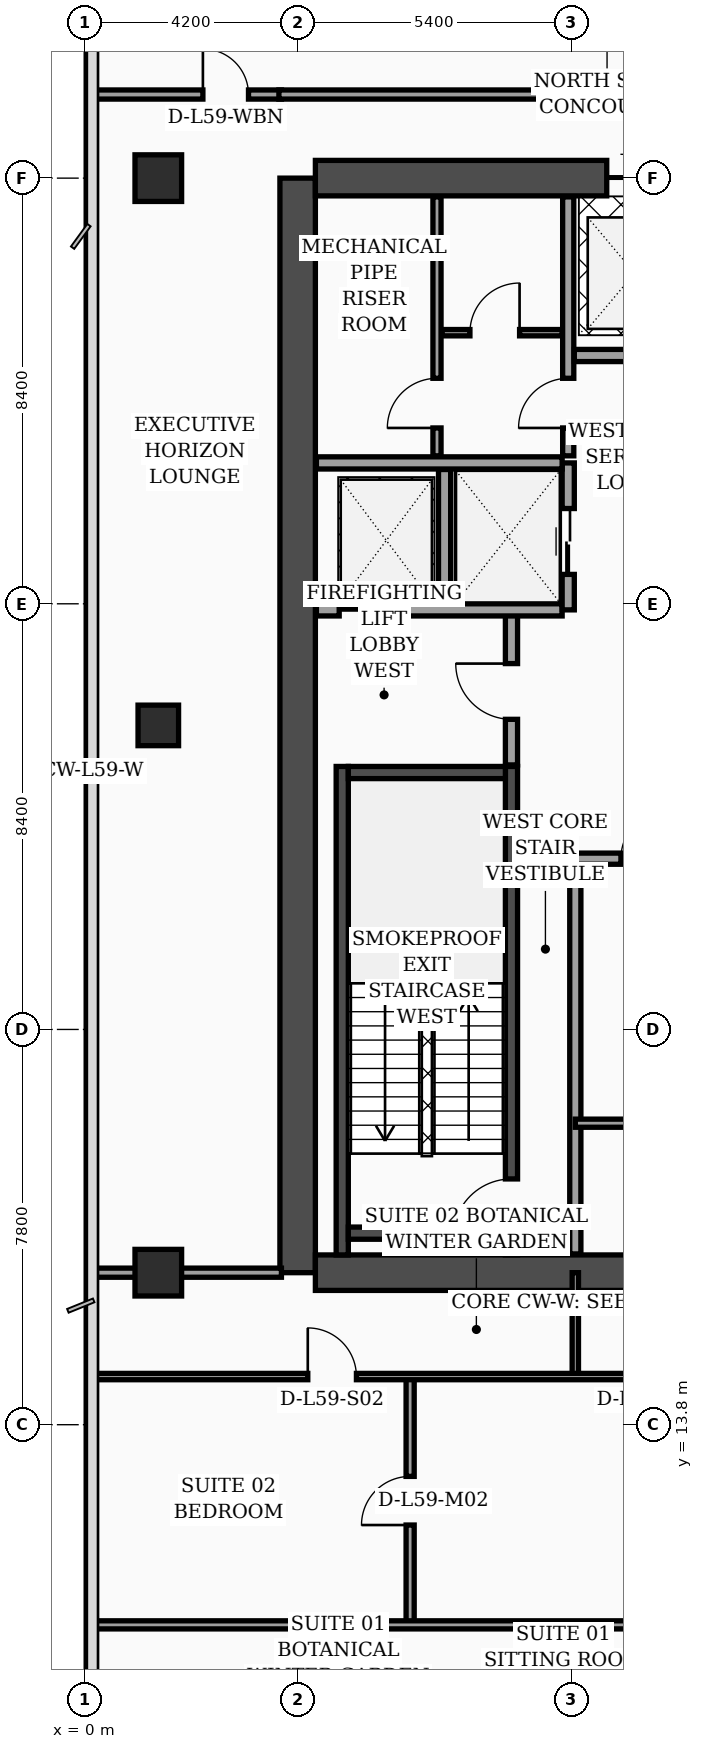
"""IFC4 building model, lengths in metres.
Left out: names, types, materials, properties, quantities, classifications, styles, units other than length and angle.
Written with IfcOpenShell. Run it as: python <this file> out.ifc"""

import sys

from ifc_helpers import new_model, si_unit, direction, frame, frame_2d, origin, origin_2d, place, context, subcontext, project, spatial, rectangle, extrude, element, fill, save


model = new_model("IFC4")
c1 = context("Model", 3, precision=1e-05, world=origin(), true_north=direction((0.0, 1.0)))
c2 = subcontext(c1, "Body", "Model", "MODEL_VIEW")
j1 = project(units=[si_unit("LENGTHUNIT", "METRE"), si_unit("PLANEANGLEUNIT", "RADIAN")], contexts=[c1])
p1 = place(None, origin())
s1 = spatial("IfcSite", under=j1, at=p1, CompositionType="ELEMENT")
p2 = place(p1, origin())
s2 = spatial("IfcBuilding", under=s1, at=p2, CompositionType="ELEMENT")
p3 = place(p2, frame((0.0, 0.0, 239.3)))
s3 = spatial("IfcBuildingStorey", under=s2, at=p3, CompositionType="ELEMENT", Elevation=239.3)
p4 = place(p3, frame((4.2, 16.8, 0.0), z_axis=(0.0, 0.0, 1.0), x_axis=(0.0, 1.0, 0.0)))
e1 = element("IfcWall", 1, at=p4, inside=s3, PredefinedType="SHEAR", context=c2, shape_type="SweptSolid", body=[
    extrude(rectangle(XDim=21.6, YDim=0.7, at=frame_2d((10.8, 0.0))), origin(), (0.0, 0.0, 1.0), 4.05),
])
p5 = place(p3, frame((4.55, 38.4, 0.0), z_axis=(0.0, 0.0, 1.0), x_axis=(1.0, 0.0, 0.0)))
e2 = element("IfcWall", 2, at=p5, inside=s3, PredefinedType="SHEAR", context=c2, shape_type="SweptSolid", body=[
    extrude(rectangle(XDim=10.1, YDim=0.7, at=frame_2d((5.05, 0.0))), origin(), (0.0, 0.0, 1.0), 4.05),
])
p6 = place(p5, frame((5.75, 0.0, 0.0)))
e3 = element("IfcOpeningElement", 3, at=p6, cuts=e2, PredefinedType="OPENING", context=c2, shape_type="SweptSolid", body=[
    extrude(rectangle(XDim=1.1, YDim=2.2, at=frame_2d((0.55, 1.1))), frame((0.0, 0.36, 0.0), z_axis=(0.0, -1.0, 0.0), x_axis=(1.0, 0.0, 0.0)), (0.0, 0.0, 1.0), 0.72),
])
p7 = place(p3, frame((4.55, 16.8, 0.0), z_axis=(0.0, 0.0, 1.0), x_axis=(1.0, 0.0, 0.0)))
e4 = element("IfcWall", 4, at=p7, inside=s3, PredefinedType="SHEAR", context=c2, shape_type="SweptSolid", body=[
    extrude(rectangle(XDim=10.1, YDim=0.7, at=frame_2d((5.05, 0.0))), origin(), (0.0, 0.0, 1.0), 4.05),
])
p8 = place(p3, frame((5.08, 17.15, 0.0), z_axis=(0.0, 0.0, 1.0), x_axis=(0.0, 1.0, 0.0)))
e5 = element("IfcWall", 5, at=p8, inside=s3, PredefinedType="SOLIDWALL", context=c2, shape_type="SweptSolid", body=[
    extrude(rectangle(XDim=9.64, YDim=0.24, at=frame_2d((4.82, 0.0))), origin(), (0.0, 0.0, 1.0), 4.05),
])
p9 = place(p3, frame((8.42, 17.15, 0.0), z_axis=(0.0, 0.0, 1.0), x_axis=(0.0, 1.0, 0.0)))
e6 = element("IfcWall", 6, at=p9, inside=s3, PredefinedType="SOLIDWALL", context=c2, shape_type="SweptSolid", body=[
    extrude(rectangle(XDim=9.64, YDim=0.24, at=frame_2d((4.82, 0.0))), origin(), (0.0, 0.0, 1.0), 4.05),
])
p10 = place(p9, frame((0.35, 0.0, 0.0)))
e7 = element("IfcOpeningElement", 7, at=p10, cuts=e6, PredefinedType="OPENING", context=c2, shape_type="SweptSolid", body=[
    extrude(rectangle(XDim=1.15, YDim=2.2, at=frame_2d((0.575, 1.1))), frame((0.0, 0.13, 0.0), z_axis=(0.0, -1.0, 0.0), x_axis=(1.0, 0.0, 0.0)), (0.0, 0.0, 1.0), 0.26),
])
for number, where, z_axis, x_axis in (
    (8, (5.2, 17.58, 0.0), (0.0, 0.0, 1.0), (1.0, 0.0, 0.0)),
    (9, (5.2, 26.67, 0.0), (0.0, 0.0, 1.0), (1.0, 0.0, 0.0)),
):
    element("IfcWall", number, at=place(p3, frame(where, z_axis=z_axis, x_axis=x_axis)), inside=s3, PredefinedType="SOLIDWALL", context=c2, shape_type="SweptSolid", body=[
        extrude(rectangle(XDim=3.1, YDim=0.24, at=frame_2d((1.55, 0.0))), origin(), (0.0, 0.0, 1.0), 4.05),
    ])
p11 = place(p3, frame((1.45, 16.8, 0.0), z_axis=(0.0, 0.0, 1.0), x_axis=(1.0, 0.0, 0.0)))
e10 = element("IfcColumn", 10, at=p11, inside=s3, PredefinedType="COLUMN", context=c2, shape_type="SweptSolid", body=[
    extrude(rectangle(XDim=0.92, YDim=0.92, at=origin_2d()), origin(), (0.0, 0.0, 1.0), 4.05),
])
p12 = place(p3, frame((1.45, 27.6, 0.0), z_axis=(0.0, 0.0, 1.0), x_axis=(1.0, 0.0, 0.0)))
e11 = element("IfcColumn", 11, at=p12, inside=s3, PredefinedType="COLUMN", context=c2, shape_type="SweptSolid", body=[
    extrude(rectangle(XDim=0.8, YDim=0.8, at=origin_2d()), origin(), (0.0, 0.0, 1.0), 4.05),
])
p13 = place(p3, frame((1.45, 38.4, 0.0), z_axis=(0.0, 0.0, 1.0), x_axis=(1.0, 0.0, 0.0)))
e12 = element("IfcColumn", 12, at=p13, inside=s3, PredefinedType="COLUMN", context=c2, shape_type="SweptSolid", body=[
    extrude(rectangle(XDim=0.92, YDim=0.92, at=origin_2d()), origin(), (0.0, 0.0, 1.0), 4.05),
])
p14 = place(p3, frame((8.42, 26.82, 0.0), z_axis=(0.0, 0.0, 1.0), x_axis=(0.0, 1.0, 0.0)))
e13 = element("IfcWall", 13, at=p14, inside=s3, PredefinedType="SOLIDWALL", context=c2, shape_type="SweptSolid", body=[
    extrude(rectangle(XDim=3.0, YDim=0.24, at=frame_2d((1.5, 0.0))), origin(), (0.0, 0.0, 1.0), 4.05),
])
p15 = place(p14, frame((0.9, 0.0, 0.0)))
e14 = element("IfcOpeningElement", 14, at=p15, cuts=e13, PredefinedType="OPENING", context=c2, shape_type="SweptSolid", body=[
    extrude(rectangle(XDim=1.1, YDim=2.2, at=frame_2d((0.55, 1.1))), frame((0.0, 0.13, 0.0), z_axis=(0.0, -1.0, 0.0), x_axis=(1.0, 0.0, 0.0)), (0.0, 0.0, 1.0), 0.26),
])
p16 = place(p3, frame((4.57, 29.88, 0.0), z_axis=(0.0, 0.0, 1.0), x_axis=(1.0, 0.0, 0.0)))
e15 = element("IfcWall", 15, at=p16, inside=s3, PredefinedType="SOLIDWALL", context=c2, shape_type="SweptSolid", body=[
    extrude(rectangle(XDim=4.85, YDim=0.24, at=frame_2d((2.425, 0.0))), origin(), (0.0, 0.0, 1.0), 4.05),
])
p17 = place(p16, frame((0.45, 0.0, 0.0)))
e16 = element("IfcOpeningElement", 16, at=p17, cuts=e15, PredefinedType="OPENING", context=c2, shape_type="SweptSolid", body=[
    extrude(rectangle(XDim=1.3, YDim=2.35, at=frame_2d((0.65, 1.175))), frame((0.0, 0.13, 0.0), z_axis=(0.0, -1.0, 0.0), x_axis=(1.0, 0.0, 0.0)), (0.0, 0.0, 1.0), 0.26),
])
p18 = place(p3, frame((7.1, 30.02, 0.0), z_axis=(0.0, 0.0, 1.0), x_axis=(0.0, 1.0, 0.0)))
e17 = element("IfcWall", 17, at=p18, inside=s3, PredefinedType="SOLIDWALL", context=c2, shape_type="SweptSolid", body=[
    extrude(rectangle(XDim=2.63, YDim=0.24, at=frame_2d((1.315, 0.0))), origin(), (0.0, 0.0, 1.0), 4.05),
])
p19 = place(p3, frame((9.54, 29.88, 0.0), z_axis=(0.0, 0.0, 1.0), x_axis=(0.0, 1.0, 0.0)))
e18 = element("IfcWall", 18, at=p19, inside=s3, PredefinedType="SOLIDWALL", context=c2, shape_type="SweptSolid", body=[
    extrude(rectangle(XDim=2.9, YDim=0.24, at=frame_2d((1.45, 0.0))), origin(), (0.0, 0.0, 1.0), 4.05),
])
p20 = place(p19, frame((0.7, 0.0, 0.0)))
e19 = element("IfcOpeningElement", 19, at=p20, cuts=e18, PredefinedType="OPENING", context=c2, shape_type="SweptSolid", body=[
    extrude(rectangle(XDim=1.3, YDim=2.35, at=frame_2d((0.65, 1.175))), frame((0.0, 0.13, 0.0), z_axis=(0.0, -1.0, 0.0), x_axis=(1.0, 0.0, 0.0)), (0.0, 0.0, 1.0), 0.26),
])
p21 = place(p3, frame((4.57, 32.78, 0.0), z_axis=(0.0, 0.0, 1.0), x_axis=(1.0, 0.0, 0.0)))
e20 = element("IfcWall", 20, at=p21, inside=s3, PredefinedType="SOLIDWALL", context=c2, shape_type="SweptSolid", body=[
    extrude(rectangle(XDim=4.85, YDim=0.24, at=frame_2d((2.425, 0.0))), origin(), (0.0, 0.0, 1.0), 3.7),
])
p22 = place(p3, frame((9.68, 17.17, 0.0), z_axis=(0.0, 0.0, 1.0), x_axis=(0.0, 1.0, 0.0)))
e21 = element("IfcWall", 21, at=p22, inside=s3, PredefinedType="SOLIDWALL", context=c2, shape_type="SweptSolid", body=[
    extrude(rectangle(XDim=7.83, YDim=0.22, at=frame_2d((3.915, 0.0))), origin(), (0.0, 0.0, 1.0), 4.05),
])
p23 = place(p3, frame((6.95, 32.92, 0.0), z_axis=(0.0, 0.0, 1.0), x_axis=(0.0, 1.0, 0.0)))
e22 = element("IfcWall", 22, at=p23, inside=s3, PredefinedType="PARTITIONING", context=c2, shape_type="SweptSolid", body=[
    extrude(rectangle(XDim=5.11, YDim=0.16, at=frame_2d((2.555, 0.0))), origin(), (0.0, 0.0, 1.0), 4.05),
])
p24 = place(p23, frame((0.55, 0.0, 0.0)))
e23 = element("IfcOpeningElement", 23, at=p24, cuts=e22, PredefinedType="OPENING", context=c2, shape_type="SweptSolid", body=[
    extrude(rectangle(XDim=0.98, YDim=2.15, at=frame_2d((0.49, 1.075))), frame((0.0, 0.09, 0.0), z_axis=(0.0, -1.0, 0.0), x_axis=(1.0, 0.0, 0.0)), (0.0, 0.0, 1.0), 0.18),
])
p25 = place(p3, frame((7.05, 35.35, 0.0), z_axis=(0.0, 0.0, 1.0), x_axis=(1.0, 0.0, 0.0)))
e24 = element("IfcWall", 24, at=p25, inside=s3, PredefinedType="PARTITIONING", context=c2, shape_type="SweptSolid", body=[
    extrude(rectangle(XDim=2.37, YDim=0.125, at=frame_2d((1.185, 0.0))), origin(), (0.0, 0.0, 1.0), 4.05),
])
p26 = place(p25, frame((0.55, 0.0, 0.0)))
e25 = element("IfcOpeningElement", 25, at=p26, cuts=e24, PredefinedType="OPENING", context=c2, shape_type="SweptSolid", body=[
    extrude(rectangle(XDim=0.98, YDim=2.15, at=frame_2d((0.49, 1.075))), frame((0.0, 0.073, 0.0), z_axis=(0.0, -1.0, 0.0), x_axis=(1.0, 0.0, 0.0)), (0.0, 0.0, 1.0), 0.145),
])
p27 = place(p3, frame((9.54, 32.92, 0.0), z_axis=(0.0, 0.0, 1.0), x_axis=(0.0, 1.0, 0.0)))
e26 = element("IfcWall", 26, at=p27, inside=s3, PredefinedType="SOLIDWALL", context=c2, shape_type="SweptSolid", body=[
    extrude(rectangle(XDim=5.11, YDim=0.22, at=frame_2d((2.555, 0.0))), origin(), (0.0, 0.0, 1.0), 4.05),
])
p28 = place(p27, frame((0.55, 0.0, 0.0)))
e27 = element("IfcOpeningElement", 27, at=p28, cuts=e26, PredefinedType="OPENING", context=c2, shape_type="SweptSolid", body=[
    extrude(rectangle(XDim=0.98, YDim=2.15, at=frame_2d((0.49, 1.075))), frame((0.0, 0.12, 0.0), z_axis=(0.0, -1.0, 0.0), x_axis=(1.0, 0.0, 0.0)), (0.0, 0.0, 1.0), 0.24),
])
p29 = place(p3, frame((9.68, 19.75, 0.0), z_axis=(0.0, 0.0, 1.0), x_axis=(1.0, 0.0, 0.0)))
e28 = element("IfcWall", 28, at=p29, inside=s3, PredefinedType="PARTITIONING", context=c2, shape_type="SweptSolid", body=[
    extrude(rectangle(XDim=4.95, YDim=0.16, at=frame_2d((2.475, 0.0))), origin(), (0.0, 0.0, 1.0), 4.05),
])
p30 = place(p29, frame((1.1, 0.0, 0.0)))
e29 = element("IfcOpeningElement", 29, at=p30, cuts=e28, PredefinedType="OPENING", context=c2, shape_type="SweptSolid", body=[
    extrude(rectangle(XDim=0.98, YDim=2.15, at=frame_2d((0.49, 1.075))), frame((0.0, 0.09, 0.0), z_axis=(0.0, -1.0, 0.0), x_axis=(1.0, 0.0, 0.0)), (0.0, 0.0, 1.0), 0.18),
])
p31 = place(p3, frame((9.68, 24.97, 0.0), z_axis=(0.0, 0.0, 1.0), x_axis=(1.0, 0.0, 0.0)))
e30 = element("IfcWall", 30, at=p31, inside=s3, PredefinedType="SOLIDWALL", context=c2, shape_type="SweptSolid", body=[
    extrude(rectangle(XDim=4.95, YDim=0.22, at=frame_2d((2.475, 0.0))), origin(), (0.0, 0.0, 1.0), 3.5),
])
p32 = place(p31, frame((0.9, 0.0, 0.0)))
e31 = element("IfcOpeningElement", 31, at=p32, cuts=e30, PredefinedType="OPENING", context=c2, shape_type="SweptSolid", body=[
    extrude(rectangle(XDim=0.98, YDim=2.15, at=frame_2d((0.49, 1.075))), frame((0.0, 0.12, 0.0), z_axis=(0.0, -1.0, 0.0), x_axis=(1.0, 0.0, 0.0)), (0.0, 0.0, 1.0), 0.24),
])
p33 = place(p3, frame((9.66, 34.9, 0.0), z_axis=(0.0, 0.0, 1.0), x_axis=(1.0, 0.0, 0.0)))
e32 = element("IfcWall", 32, at=p33, inside=s3, PredefinedType="SOLIDWALL", context=c2, shape_type="SweptSolid", body=[
    extrude(rectangle(XDim=4.97, YDim=0.24, at=frame_2d((2.485, 0.0))), origin(), (0.0, 0.0, 1.0), 4.05),
])
p34 = place(p3, frame((0.08, 16.8, 0.0), z_axis=(0.0, 0.0, 1.0), x_axis=(1.0, 0.0, 0.0)))
e33 = element("IfcWall", 33, at=p34, inside=s3, PredefinedType="PARTITIONING", context=c2, shape_type="SweptSolid", body=[
    extrude(rectangle(XDim=3.8, YDim=0.18, at=frame_2d((1.9, 0.0))), origin(), (0.0, 0.0, 1.0), 3.5),
])
p35 = place(p3, frame((0.08, 40.05, 0.0), z_axis=(0.0, 0.0, 1.0), x_axis=(1.0, 0.0, 0.0)))
e34 = element("IfcWall", 34, at=p35, inside=s3, PredefinedType="PARTITIONING", context=c2, shape_type="SweptSolid", body=[
    extrude(rectangle(XDim=3.8, YDim=0.18, at=frame_2d((1.9, 0.0))), origin(), (0.0, 0.0, 1.0), 3.5),
])
p36 = place(p35, frame((2.25, 0.0, 0.0)))
e35 = element("IfcOpeningElement", 35, at=p36, cuts=e34, PredefinedType="OPENING", context=c2, shape_type="SweptSolid", body=[
    extrude(rectangle(XDim=0.9, YDim=2.15, at=frame_2d((0.45, 1.075))), frame((0.0, 0.1, 0.0), z_axis=(0.0, -1.0, 0.0), x_axis=(1.0, 0.0, 0.0)), (0.0, 0.0, 1.0), 0.2),
])
p37 = place(p3, frame((9.68, 7.92, 0.0), z_axis=(0.0, 0.0, 1.0), x_axis=(0.0, 1.0, 0.0)))
e36 = element("IfcWall", 36, at=p37, inside=s3, PredefinedType="PARTITIONING", context=c2, shape_type="SweptSolid", body=[
    extrude(rectangle(XDim=1.93, YDim=0.125, at=frame_2d((0.965, 0.0))), origin(), (0.0, 0.0, 1.0), 3.6),
])
p38 = place(p3, frame((9.68, 14.75, 0.0), z_axis=(0.0, 0.0, 1.0), x_axis=(0.0, 1.0, 0.0)))
e37 = element("IfcWall", 37, at=p38, inside=s3, PredefinedType="PARTITIONING", context=c2, shape_type="SweptSolid", body=[
    extrude(rectangle(XDim=2.05, YDim=0.125, at=frame_2d((1.025, 0.0))), origin(), (0.0, 0.0, 1.0), 4.05),
])
p39 = place(p3, frame((6.42, 9.85, 0.0), z_axis=(0.0, 0.0, 1.0), x_axis=(0.0, 1.0, 0.0)))
e38 = element("IfcWall", 38, at=p39, inside=s3, PredefinedType="PARTITIONING", context=c2, shape_type="SweptSolid", body=[
    extrude(rectangle(XDim=4.9, YDim=0.16, at=frame_2d((2.45, 0.0))), origin(), (0.0, 0.0, 1.0), 3.65),
])
p40 = place(p39, frame((1.97, 0.0, 0.0)))
e39 = element("IfcOpeningElement", 39, at=p40, cuts=e38, PredefinedType="OPENING", context=c2, shape_type="SweptSolid", body=[
    extrude(rectangle(XDim=0.96, YDim=2.2, at=frame_2d((0.48, 1.1))), frame((0.0, 0.09, 0.0), z_axis=(0.0, -1.0, 0.0), x_axis=(1.0, 0.0, 0.0)), (0.0, 0.0, 1.0), 0.18),
])
p41 = place(p3, frame((0.08, 14.75, 0.0), z_axis=(0.0, 0.0, 1.0), x_axis=(1.0, 0.0, 0.0)))
e40 = element("IfcWall", 40, at=p41, inside=s3, PredefinedType="PARTITIONING", context=c2, shape_type="SweptSolid", body=[
    extrude(rectangle(XDim=12.52, YDim=0.125, at=frame_2d((6.26, 0.0))), origin(), (0.0, 0.0, 1.0), 3.5),
])
p42 = place(p41, frame((4.32, 0.0, 0.0)))
e41 = element("IfcOpeningElement", 41, at=p42, cuts=e40, PredefinedType="OPENING", context=c2, shape_type="SweptSolid", body=[
    extrude(rectangle(XDim=0.96, YDim=2.2, at=frame_2d((0.48, 1.1))), frame((0.0, 0.073, 0.0), z_axis=(0.0, -1.0, 0.0), x_axis=(1.0, 0.0, 0.0)), (0.0, 0.0, 1.0), 0.145),
])
p43 = place(p41, frame((10.61, 0.0, 0.0)))
e42 = element("IfcOpeningElement", 42, at=p43, cuts=e40, PredefinedType="OPENING", context=c2, shape_type="SweptSolid", body=[
    extrude(rectangle(XDim=0.9, YDim=2.15, at=frame_2d((0.45, 1.075))), frame((0.0, 0.073, 0.0), z_axis=(0.0, -1.0, 0.0), x_axis=(1.0, 0.0, 0.0)), (0.0, 0.0, 1.0), 0.145),
])
p44 = place(p3, frame((0.08, 9.85, 0.0), z_axis=(0.0, 0.0, 1.0), x_axis=(1.0, 0.0, 0.0)))
e43 = element("IfcWall", 43, at=p44, inside=s3, PredefinedType="PARTITIONING", context=c2, shape_type="SweptSolid", body=[
    extrude(rectangle(XDim=12.52, YDim=0.16, at=frame_2d((6.26, 0.0))), origin(), (0.0, 0.0, 1.0), 3.5),
])
p45 = place(p3, frame((3.83, 40.05, 0.0), z_axis=(0.0, 0.0, 1.0), x_axis=(1.0, 0.0, 0.0)))
e44 = element("IfcWall", 44, at=p45, inside=s3, PredefinedType="PARTITIONING", context=c2, shape_type="SweptSolid", body=[
    extrude(rectangle(XDim=11.32, YDim=0.18, at=frame_2d((5.66, 0.0))), origin(), (0.0, 0.0, 1.0), 3.5),
])
p46 = place(p15, origin())
e45 = element("IfcDoor", 45, at=p46, inside=s3, OperationType="SINGLE_SWING_RIGHT", PredefinedType="DOOR", context=c2, shape_type="SweptSolid", body=[
    extrude(rectangle(XDim=1.1, YDim=2.2, at=frame_2d((0.55, 1.1))), frame((0.0, 0.025, 0.0), z_axis=(0.0, -1.0, 0.0), x_axis=(1.0, 0.0, 0.0)), (0.0, 0.0, 1.0), 0.05),
])
fill(e14, e45)
p47 = place(p17, origin())
e46 = element("IfcDoor", 46, at=p47, inside=s3, OperationType="DOUBLE_DOOR_SLIDING", PredefinedType="DOOR", context=c2, shape_type="SweptSolid", body=[
    extrude(rectangle(XDim=1.3, YDim=2.35, at=frame_2d((0.65, 1.175))), frame((0.0, 0.025, 0.0), z_axis=(0.0, -1.0, 0.0), x_axis=(1.0, 0.0, 0.0)), (0.0, 0.0, 1.0), 0.05),
])
fill(e16, e46)
p48 = place(p20, origin())
e47 = element("IfcDoor", 47, at=p48, inside=s3, OperationType="DOUBLE_DOOR_SLIDING", PredefinedType="DOOR", context=c2, shape_type="SweptSolid", body=[
    extrude(rectangle(XDim=1.3, YDim=2.35, at=frame_2d((0.65, 1.175))), frame((0.0, 0.025, 0.0), z_axis=(0.0, -1.0, 0.0), x_axis=(1.0, 0.0, 0.0)), (0.0, 0.0, 1.0), 0.05),
])
fill(e19, e47)
p49 = place(p24, origin())
e48 = element("IfcDoor", 48, at=p49, inside=s3, OperationType="SINGLE_SWING_LEFT", PredefinedType="DOOR", context=c2, shape_type="SweptSolid", body=[
    extrude(rectangle(XDim=0.98, YDim=2.15, at=frame_2d((0.49, 1.075))), frame((0.0, 0.025, 0.0), z_axis=(0.0, -1.0, 0.0), x_axis=(1.0, 0.0, 0.0)), (0.0, 0.0, 1.0), 0.05),
])
fill(e23, e48)
p50 = place(p26, origin())
e49 = element("IfcDoor", 49, at=p50, inside=s3, OperationType="SINGLE_SWING_RIGHT", PredefinedType="DOOR", context=c2, shape_type="SweptSolid", body=[
    extrude(rectangle(XDim=0.98, YDim=2.15, at=frame_2d((0.49, 1.075))), frame((0.0, 0.025, 0.0), z_axis=(0.0, -1.0, 0.0), x_axis=(1.0, 0.0, 0.0)), (0.0, 0.0, 1.0), 0.05),
])
fill(e25, e49)
p51 = place(p28, origin())
e50 = element("IfcDoor", 50, at=p51, inside=s3, OperationType="SINGLE_SWING_LEFT", PredefinedType="DOOR", context=c2, shape_type="SweptSolid", body=[
    extrude(rectangle(XDim=0.98, YDim=2.15, at=frame_2d((0.49, 1.075))), frame((0.0, 0.025, 0.0), z_axis=(0.0, -1.0, 0.0), x_axis=(1.0, 0.0, 0.0)), (0.0, 0.0, 1.0), 0.05),
])
fill(e27, e50)
p52 = place(p32, origin())
e51 = element("IfcDoor", 51, at=p52, inside=s3, OperationType="SINGLE_SWING_RIGHT", PredefinedType="DOOR", context=c2, shape_type="SweptSolid", body=[
    extrude(rectangle(XDim=0.98, YDim=2.15, at=frame_2d((0.49, 1.075))), frame((0.0, 0.025, 0.0), z_axis=(0.0, -1.0, 0.0), x_axis=(1.0, 0.0, 0.0)), (0.0, 0.0, 1.0), 0.05),
])
fill(e31, e51)
p53 = place(p36, origin())
e52 = element("IfcDoor", 52, at=p53, inside=s3, OperationType="SINGLE_SWING_LEFT", PredefinedType="DOOR", context=c2, shape_type="SweptSolid", body=[
    extrude(rectangle(XDim=0.9, YDim=2.15, at=frame_2d((0.45, 1.075))), frame((0.0, 0.025, 0.0), z_axis=(0.0, -1.0, 0.0), x_axis=(1.0, 0.0, 0.0)), (0.0, 0.0, 1.0), 0.05),
])
fill(e35, e52)
p54 = place(p40, origin())
e53 = element("IfcDoor", 53, at=p54, inside=s3, OperationType="SINGLE_SWING_LEFT", PredefinedType="DOOR", context=c2, shape_type="SweptSolid", body=[
    extrude(rectangle(XDim=0.96, YDim=2.2, at=frame_2d((0.48, 1.1))), frame((0.0, 0.025, 0.0), z_axis=(0.0, -1.0, 0.0), x_axis=(1.0, 0.0, 0.0)), (0.0, 0.0, 1.0), 0.05),
])
fill(e39, e53)
p55 = place(p42, origin())
e54 = element("IfcDoor", 54, at=p55, inside=s3, OperationType="SINGLE_SWING_LEFT", PredefinedType="DOOR", context=c2, shape_type="SweptSolid", body=[
    extrude(rectangle(XDim=0.96, YDim=2.2, at=frame_2d((0.48, 1.1))), frame((0.0, 0.025, 0.0), z_axis=(0.0, -1.0, 0.0), x_axis=(1.0, 0.0, 0.0)), (0.0, 0.0, 1.0), 0.05),
])
fill(e41, e54)
p56 = place(p10, origin())
e55 = element("IfcDoor", 55, at=p56, inside=s3, OperationType="SINGLE_SWING_LEFT", PredefinedType="DOOR", context=c2, shape_type="SweptSolid", body=[
    extrude(rectangle(XDim=1.15, YDim=2.2, at=frame_2d((0.575, 1.1))), frame((0.0, 0.025, 0.0), z_axis=(0.0, -1.0, 0.0), x_axis=(1.0, 0.0, 0.0)), (0.0, 0.0, 1.0), 0.05),
])
fill(e7, e55)
p57 = place(p6, origin())
e56 = element("IfcDoor", 56, at=p57, inside=s3, OperationType="DOUBLE_DOOR_SLIDING", PredefinedType="DOOR", context=c2, shape_type="SweptSolid", body=[
    extrude(rectangle(XDim=1.1, YDim=2.2, at=frame_2d((0.55, 1.1))), frame((0.0, 0.025, 0.0), z_axis=(0.0, -1.0, 0.0), x_axis=(1.0, 0.0, 0.0)), (0.0, 0.0, 1.0), 0.05),
])
fill(e3, e56)
save(model, sys.argv[1])
